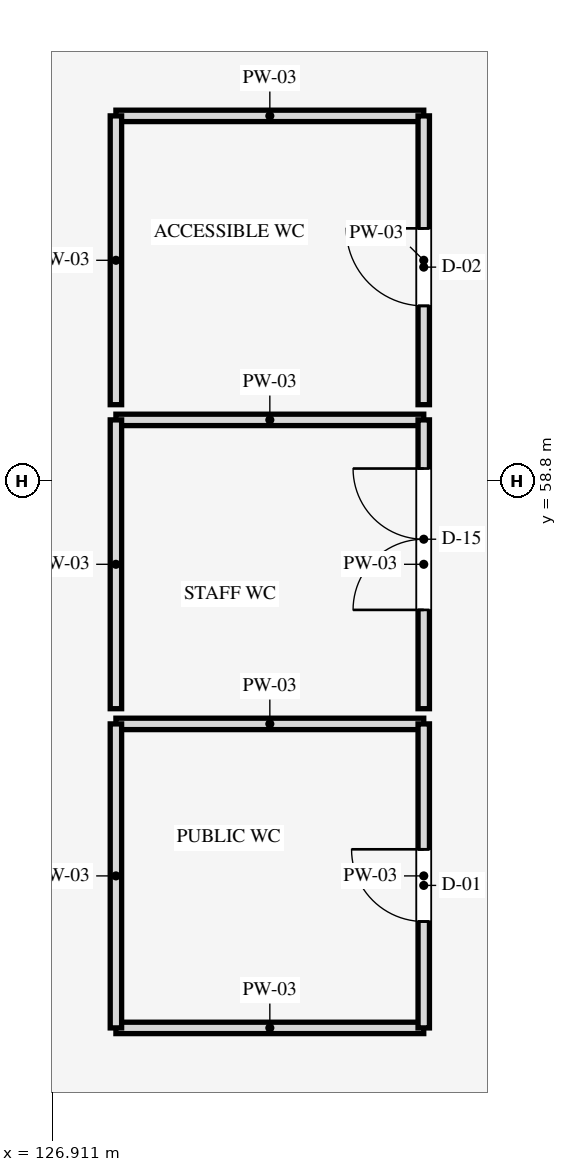
"""IFC4 building model, lengths in metres.
Left out: names, types, materials, properties, quantities, classifications, styles, units other than length and angle.
Written with IfcOpenShell. Run it as: python <this file> out.ifc"""

import sys

from ifc_helpers import new_model, si_unit, direction, frame, frame_2d, origin, place, context, subcontext, project, spatial, rectangle, extrude, element, fill, save


model = new_model("IFC4")
c1 = context("Model", 3, precision=1e-05, world=origin(), true_north=direction((0.0, 1.0)))
c2 = subcontext(c1, "Body", "Model", "MODEL_VIEW")
j1 = project(units=[si_unit("LENGTHUNIT", "METRE"), si_unit("PLANEANGLEUNIT", "RADIAN")], contexts=[c1])
p1 = place(None, origin())
s1 = spatial("IfcSite", under=j1, at=p1, CompositionType="ELEMENT")
p2 = place(p1, origin())
s2 = spatial("IfcBuilding", under=s1, at=p2, CompositionType="ELEMENT")
p3 = place(p2, frame((0.0, 0.0, 23.4)))
s3 = spatial("IfcBuildingStorey", under=s2, at=p3, CompositionType="ELEMENT", Elevation=23.4)
for number, where, z_axis, x_axis in (
    (1, (127.75, 51.6, 0.0), (0.0, 0.0, 1.0), (1.0, 0.0, 0.0)),
    (2, (127.75, 55.6, 0.0), (0.0, 0.0, 1.0), (1.0, 0.0, 0.0)),
):
    element("IfcWall", number, at=place(p3, frame(where, z_axis=z_axis, x_axis=x_axis)), inside=s3, PredefinedType="PARTITIONING", context=c2, shape_type="SweptSolid", body=[
        extrude(rectangle(XDim=4.05, YDim=0.15, at=frame_2d((2.025, 0.0))), origin(), (0.0, 0.0, 1.0), 3.54),
    ])
p4 = place(p3, frame((127.75, 51.6, 0.0), z_axis=(0.0, 0.0, 1.0), x_axis=(0.0, 1.0, 0.0)))
e3 = element("IfcWall", 3, at=p4, inside=s3, PredefinedType="PARTITIONING", context=c2, shape_type="SweptSolid", body=[
    extrude(rectangle(XDim=4.0, YDim=0.15, at=frame_2d((2.0, 0.0))), origin(), (0.0, 0.0, 1.0), 3.54),
])
p5 = place(p3, frame((131.8, 51.6, 0.0), z_axis=(0.0, 0.0, 1.0), x_axis=(0.0, 1.0, 0.0)))
e4 = element("IfcWall", 4, at=p5, inside=s3, PredefinedType="PARTITIONING", context=c2, shape_type="SweptSolid", body=[
    extrude(rectangle(XDim=4.0, YDim=0.15, at=frame_2d((2.0, 0.0))), origin(), (0.0, 0.0, 1.0), 3.54),
])
p6 = place(p5, frame((1.4, 0.0, 0.0)))
e5 = element("IfcOpeningElement", 5, at=p6, cuts=e4, PredefinedType="OPENING", context=c2, shape_type="SweptSolid", body=[
    extrude(rectangle(XDim=0.95, YDim=2.1, at=frame_2d((0.475, 1.05))), frame((0.0, 0.085, 0.0), z_axis=(0.0, -1.0, 0.0), x_axis=(1.0, 0.0, 0.0)), (0.0, 0.0, 1.0), 0.17),
])
p7 = place(p3, frame((127.75, 59.6, 0.0), z_axis=(0.0, 0.0, 1.0), x_axis=(1.0, 0.0, 0.0)))
e6 = element("IfcWall", 6, at=p7, inside=s3, PredefinedType="PARTITIONING", context=c2, shape_type="SweptSolid", body=[
    extrude(rectangle(XDim=4.05, YDim=0.15, at=frame_2d((2.025, 0.0))), origin(), (0.0, 0.0, 1.0), 3.54),
])
p8 = place(p3, frame((127.75, 55.8, 0.0), z_axis=(0.0, 0.0, 1.0), x_axis=(0.0, 1.0, 0.0)))
e7 = element("IfcWall", 7, at=p8, inside=s3, PredefinedType="PARTITIONING", context=c2, shape_type="SweptSolid", body=[
    extrude(rectangle(XDim=3.8, YDim=0.15, at=frame_2d((1.9, 0.0))), origin(), (0.0, 0.0, 1.0), 3.54),
])
p9 = place(p3, frame((131.8, 55.8, 0.0), z_axis=(0.0, 0.0, 1.0), x_axis=(0.0, 1.0, 0.0)))
e8 = element("IfcWall", 8, at=p9, inside=s3, PredefinedType="PARTITIONING", context=c2, shape_type="SweptSolid", body=[
    extrude(rectangle(XDim=3.8, YDim=0.15, at=frame_2d((1.9, 0.0))), origin(), (0.0, 0.0, 1.0), 3.54),
])
p10 = place(p9, frame((1.3, 0.0, 0.0)))
e9 = element("IfcOpeningElement", 9, at=p10, cuts=e8, PredefinedType="OPENING", context=c2, shape_type="SweptSolid", body=[
    extrude(rectangle(XDim=1.86, YDim=2.26, at=frame_2d((0.93, 1.13))), frame((0.0, 0.085, 0.0), z_axis=(0.0, -1.0, 0.0), x_axis=(1.0, 0.0, 0.0)), (0.0, 0.0, 1.0), 0.17),
])
p11 = place(p3, frame((127.75, 63.6, 0.0), z_axis=(0.0, 0.0, 1.0), x_axis=(1.0, 0.0, 0.0)))
e10 = element("IfcWall", 10, at=p11, inside=s3, PredefinedType="PARTITIONING", context=c2, shape_type="SweptSolid", body=[
    extrude(rectangle(XDim=4.05, YDim=0.15, at=frame_2d((2.025, 0.0))), origin(), (0.0, 0.0, 1.0), 3.54),
])
p12 = place(p3, frame((127.75, 59.8, 0.0), z_axis=(0.0, 0.0, 1.0), x_axis=(0.0, 1.0, 0.0)))
e11 = element("IfcWall", 11, at=p12, inside=s3, PredefinedType="PARTITIONING", context=c2, shape_type="SweptSolid", body=[
    extrude(rectangle(XDim=3.8, YDim=0.15, at=frame_2d((1.9, 0.0))), origin(), (0.0, 0.0, 1.0), 3.54),
])
p13 = place(p3, frame((131.8, 59.8, 0.0), z_axis=(0.0, 0.0, 1.0), x_axis=(0.0, 1.0, 0.0)))
e12 = element("IfcWall", 12, at=p13, inside=s3, PredefinedType="PARTITIONING", context=c2, shape_type="SweptSolid", body=[
    extrude(rectangle(XDim=3.8, YDim=0.15, at=frame_2d((1.9, 0.0))), origin(), (0.0, 0.0, 1.0), 3.54),
])
p14 = place(p13, frame((1.3, 0.0, 0.0)))
e13 = element("IfcOpeningElement", 13, at=p14, cuts=e12, PredefinedType="OPENING", context=c2, shape_type="SweptSolid", body=[
    extrude(rectangle(XDim=1.02, YDim=2.1, at=frame_2d((0.51, 1.05))), frame((0.0, 0.085, 0.0), z_axis=(0.0, -1.0, 0.0), x_axis=(1.0, 0.0, 0.0)), (0.0, 0.0, 1.0), 0.17),
])
p15 = place(p6, origin())
e14 = element("IfcDoor", 14, at=p15, inside=s3, OperationType="SINGLE_SWING_RIGHT", PredefinedType="DOOR", context=c2, shape_type="SweptSolid", body=[
    extrude(rectangle(XDim=0.95, YDim=2.1, at=frame_2d((0.475, 1.05))), frame((0.0, 0.025, 0.0), z_axis=(0.0, -1.0, 0.0), x_axis=(1.0, 0.0, 0.0)), (0.0, 0.0, 1.0), 0.05),
])
fill(e5, e14)
p16 = place(p10, origin())
e15 = element("IfcDoor", 15, at=p16, inside=s3, OperationType="DOUBLE_DOOR_SINGLE_SWING", PredefinedType="DOOR", context=c2, shape_type="SweptSolid", body=[
    extrude(rectangle(XDim=1.86, YDim=2.26, at=frame_2d((0.93, 1.13))), frame((0.0, 0.025, 0.0), z_axis=(0.0, -1.0, 0.0), x_axis=(1.0, 0.0, 0.0)), (0.0, 0.0, 1.0), 0.05),
])
fill(e9, e15)
p17 = place(p14, origin())
e16 = element("IfcDoor", 16, at=p17, inside=s3, OperationType="SINGLE_SWING_RIGHT", PredefinedType="DOOR", context=c2, shape_type="SweptSolid", body=[
    extrude(rectangle(XDim=1.02, YDim=2.1, at=frame_2d((0.51, 1.05))), frame((0.0, 0.025, 0.0), z_axis=(0.0, -1.0, 0.0), x_axis=(1.0, 0.0, 0.0)), (0.0, 0.0, 1.0), 0.05),
])
fill(e13, e16)
save(model, sys.argv[1])
